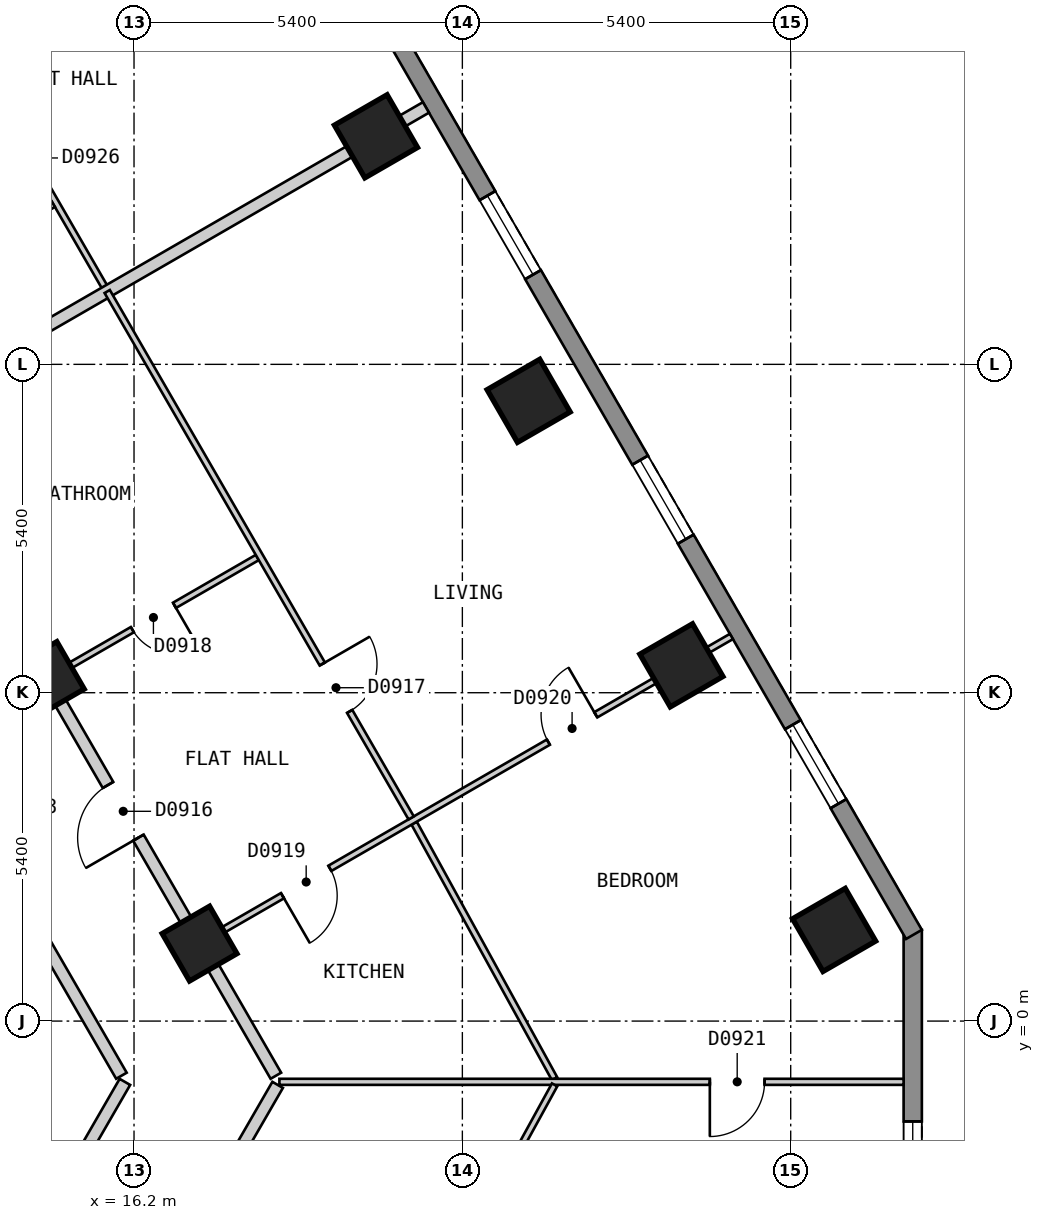
"""IFC4 building model, lengths in metres.
Left out: names, types, materials, properties, quantities, classifications, styles, units other than length and angle.
Written with IfcOpenShell. Run it as: python <this file> out.ifc"""

import sys

from ifc_helpers import new_model, si_unit, direction, frame, frame_2d, origin, origin_2d, place, context, subcontext, project, spatial, polyline, rectangle, outline, extrude, element, fill, save


model = new_model("IFC4")
c1 = context("Model", 3, precision=1e-05, world=origin(), true_north=direction((0.0, 1.0)))
c2 = subcontext(c1, "Body", "Model", "MODEL_VIEW")
j1 = project(units=[si_unit("LENGTHUNIT", "METRE"), si_unit("PLANEANGLEUNIT", "RADIAN")], contexts=[c1])
p1 = place(None, origin())
s1 = spatial("IfcSite", under=j1, at=p1, CompositionType="ELEMENT")
p2 = place(p1, origin())
s2 = spatial("IfcBuilding", under=s1, at=p2, CompositionType="ELEMENT")
p3 = place(p2, frame((0.0, 0.0, 90.0)))
s3 = spatial("IfcBuildingStorey", under=s2, at=p3, CompositionType="ELEMENT", Elevation=90.0)
for number, where, z_axis, x_axis in (
    (1, (27.714, 1.499, 0.0), (0.0, 0.0, 1.0), (-0.5, 0.866, 0.0)),
    (2, (25.202, 5.85, 0.0), (0.0, 0.0, 1.0), (-0.5, 0.866, 0.0)),
    (3, (22.69, 10.2, 0.0), (0.0, 0.0, 1.0), (-0.5, 0.866, 0.0)),
    (4, (20.179, 14.55, 0.0), (0.0, 0.0, 1.0), (-0.5, 0.866, 0.0)),
):
    element("IfcColumn", number, at=place(p3, frame(where, z_axis=z_axis, x_axis=x_axis)), inside=s3, PredefinedType="COLUMN", context=c2, shape_type="SweptSolid", body=[
        extrude(rectangle(XDim=1.0, YDim=1.0, at=origin_2d()), origin(), (0.0, 0.0, 1.0), 3.0),
    ])
for number, where, z_axis, x_axis in (
    (5, (17.278, 1.274, 0.0), (0.0, 0.0, 1.0), (-0.5, 0.866, 0.0)),
    (6, (14.766, 5.625, 0.0), (0.0, 0.0, 1.0), (-0.5, 0.866, 0.0)),
):
    element("IfcColumn", number, at=place(p3, frame(where, z_axis=z_axis, x_axis=x_axis)), inside=s3, PredefinedType="COLUMN", context=c2, shape_type="SweptSolid", body=[
        extrude(rectangle(XDim=0.9, YDim=0.9, at=origin_2d()), origin(), (0.0, 0.0, 1.0), 3.0),
    ])
p4 = place(p3, frame((29.007, -3.5, 0.0), z_axis=(0.0, 0.0, 1.0), x_axis=(0.0, 1.0, 0.0)))
e7 = element("IfcWall", 7, at=p4, inside=s3, PredefinedType="SOLIDWALL", context=c2, shape_type="SweptSolid", body=[
    extrude(outline(polyline([(0.0, -0.15), (5.0, -0.15), (4.92, 0.15), (0.08, 0.15), (0.0, -0.15)])), origin(), (0.0, 0.0, 1.0), 2.7),
])
p5 = place(p4, frame((0.65, 0.0, 0.15)))
e8 = element("IfcOpeningElement", 8, at=p5, cuts=e7, PredefinedType="OPENING", context=c2, shape_type="SweptSolid", body=[
    extrude(rectangle(XDim=1.2, YDim=2.1, at=frame_2d((0.6, 1.05))), frame((0.0, 0.16, 0.0), z_axis=(0.0, -1.0, 0.0), x_axis=(1.0, 0.0, 0.0)), (0.0, 0.0, 1.0), 0.32),
])
p6 = place(p3, frame((29.027, 1.425, 0.0), z_axis=(0.0, 0.0, 1.0), x_axis=(-0.500027479704, 0.866009537788, 0.0)))
e9 = element("IfcWall", 9, at=p6, inside=s3, PredefinedType="SOLIDWALL", context=c2, shape_type="SweptSolid", body=[
    extrude(outline(polyline([(0.0, -0.15), (26.559, -0.15), (26.478, 0.15), (0.08, 0.15), (0.0, -0.15)])), origin(), (0.0, 0.0, 1.0), 2.7),
])
p7 = place(p6, frame((2.483, 0.0, 0.15)))
e10 = element("IfcOpeningElement", 10, at=p7, cuts=e9, PredefinedType="OPENING", context=c2, shape_type="SweptSolid", body=[
    extrude(rectangle(XDim=1.5, YDim=2.1, at=frame_2d((0.75, 1.05))), frame((0.0, 0.16, 0.0), z_axis=(0.0, -1.0, 0.0), x_axis=(1.0, 0.0, 0.0)), (0.0, 0.0, 1.0), 0.32),
])
p8 = place(p6, frame((7.506, 0.0, 0.15)))
e11 = element("IfcOpeningElement", 11, at=p8, cuts=e9, PredefinedType="OPENING", context=c2, shape_type="SweptSolid", body=[
    extrude(rectangle(XDim=1.5, YDim=2.1, at=frame_2d((0.75, 1.05))), frame((0.0, 0.16, 0.0), z_axis=(0.0, -1.0, 0.0), x_axis=(1.0, 0.0, 0.0)), (0.0, 0.0, 1.0), 0.32),
])
p9 = place(p6, frame((12.529, 0.0, 0.15)))
e12 = element("IfcOpeningElement", 12, at=p9, cuts=e9, PredefinedType="OPENING", context=c2, shape_type="SweptSolid", body=[
    extrude(rectangle(XDim=1.5, YDim=2.1, at=frame_2d((0.75, 1.05))), frame((0.0, 0.16, 0.0), z_axis=(0.0, -1.0, 0.0), x_axis=(1.0, 0.0, 0.0)), (0.0, 0.0, 1.0), 0.32),
])
p10 = place(p6, frame((17.552, 0.0, 0.15)))
e13 = element("IfcOpeningElement", 13, at=p10, cuts=e9, PredefinedType="OPENING", context=c2, shape_type="SweptSolid", body=[
    extrude(rectangle(XDim=1.5, YDim=2.1, at=frame_2d((0.75, 1.05))), frame((0.0, 0.16, 0.0), z_axis=(0.0, -1.0, 0.0), x_axis=(1.0, 0.0, 0.0)), (0.0, 0.0, 1.0), 0.32),
])
p11 = place(p6, frame((22.575, 0.0, 0.15)))
e14 = element("IfcOpeningElement", 14, at=p11, cuts=e9, PredefinedType="OPENING", context=c2, shape_type="SweptSolid", body=[
    extrude(rectangle(XDim=1.5, YDim=2.1, at=frame_2d((0.75, 1.05))), frame((0.0, 0.16, 0.0), z_axis=(0.0, -1.0, 0.0), x_axis=(1.0, 0.0, 0.0)), (0.0, 0.0, 1.0), 0.32),
])
p12 = place(p3, frame((10.913, 7.899, 0.0), z_axis=(0.0, 0.0, 1.0), x_axis=(0.500028940566, -0.866008694296, 0.0)))
e15 = element("IfcWall", 15, at=p12, inside=s3, PredefinedType="PARTITIONING", context=c2, shape_type="SweptSolid", body=[
    extrude(rectangle(XDim=10.159, YDim=0.2, at=frame_2d((5.08, 0.0))), origin(), (0.0, 0.0, 1.0), 2.7),
])
p13 = place(p12, frame((4.63, 0.0, 0.0)))
e16 = element("IfcOpeningElement", 16, at=p13, cuts=e15, PredefinedType="OPENING", context=c2, shape_type="SweptSolid", body=[
    extrude(rectangle(XDim=0.9, YDim=2.1, at=frame_2d((0.45, 1.05))), frame((0.0, 0.11, 0.0), z_axis=(0.0, -1.0, 0.0), x_axis=(1.0, 0.0, 0.0)), (0.0, 0.0, 1.0), 0.22),
])
p14 = place(p3, frame((8.488, 16.5, 0.0), z_axis=(0.0, 0.0, 1.0), x_axis=(0.499986836607, -0.86603300354, 0.0)))
e17 = element("IfcWall", 17, at=p14, inside=s3, PredefinedType="PARTITIONING", context=c2, shape_type="SweptSolid", body=[
    extrude(rectangle(XDim=20.09, YDim=0.2, at=frame_2d((10.045, 0.0))), origin(), (0.0, 0.0, 1.0), 2.7),
])
p15 = place(p14, frame((14.569, 0.0, 0.0)))
e18 = element("IfcOpeningElement", 18, at=p15, cuts=e17, PredefinedType="OPENING", context=c2, shape_type="SweptSolid", body=[
    extrude(rectangle(XDim=1.0, YDim=2.1, at=frame_2d((0.5, 1.05))), frame((0.0, 0.11, 0.0), z_axis=(0.0, -1.0, 0.0), x_axis=(1.0, 0.0, 0.0)), (0.0, 0.0, 1.0), 0.22),
])
p16 = place(p14, frame((4.547, 0.0, 0.0)))
e19 = element("IfcOpeningElement", 19, at=p16, cuts=e17, PredefinedType="OPENING", context=c2, shape_type="SweptSolid", body=[
    extrude(rectangle(XDim=1.0, YDim=2.1, at=frame_2d((0.5, 1.05))), frame((0.0, 0.11, 0.0), z_axis=(0.0, -1.0, 0.0), x_axis=(1.0, 0.0, 0.0)), (0.0, 0.0, 1.0), 0.22),
])
p17 = place(p3, frame((15.011, -2.8, 0.0), z_axis=(0.0, 0.0, 1.0), x_axis=(0.499929208183, 0.866066271601, 0.0)))
e20 = element("IfcWall", 20, at=p17, inside=s3, PredefinedType="PARTITIONING", context=c2, shape_type="SweptSolid", body=[
    extrude(rectangle(XDim=2.078, YDim=0.2, at=frame_2d((1.039, 0.0))), origin(), (0.0, 0.0, 1.0), 2.7),
])
p18 = place(p3, frame((15.771, -5.884, 0.0), z_axis=(0.0, 0.0, 1.0), x_axis=(0.499939494019, 0.866060334111, 0.0)))
e21 = element("IfcWall", 21, at=p18, inside=s3, PredefinedType="PARTITIONING", context=c2, shape_type="SweptSolid", body=[
    extrude(rectangle(XDim=5.583, YDim=0.2, at=frame_2d((2.792, 0.0))), origin(), (0.0, 0.0, 1.0), 2.7),
])
p19 = place(p3, frame((13.263, 16.322, 0.0), z_axis=(0.0, 0.0, 1.0), x_axis=(0.499946798379, -0.866056117576, 0.0)))
e22 = element("IfcWall", 22, at=p19, inside=s3, PredefinedType="PARTITIONING", context=c2, shape_type="SweptSolid", body=[
    extrude(rectangle(XDim=4.993, YDim=0.1, at=frame_2d((2.496, 0.0))), origin(), (0.0, 0.0, 1.0), 2.7),
])
p20 = place(p19, frame((2.007, 0.0, 0.0)))
e23 = element("IfcOpeningElement", 23, at=p20, cuts=e22, PredefinedType="OPENING", context=c2, shape_type="SweptSolid", body=[
    extrude(rectangle(XDim=0.9, YDim=2.1, at=frame_2d((0.45, 1.05))), frame((0.0, 0.06, 0.0), z_axis=(0.0, -1.0, 0.0), x_axis=(1.0, 0.0, 0.0)), (0.0, 0.0, 1.0), 0.12),
])
p21 = place(p3, frame((20.807, 3.255, 0.0), z_axis=(0.0, 0.0, 1.0), x_axis=(0.481604009855, -0.876388942018, 0.0)))
e24 = element("IfcWall", 24, at=p21, inside=s3, PredefinedType="PARTITIONING", context=c2, shape_type="SweptSolid", body=[
    extrude(rectangle(XDim=4.795, YDim=0.1, at=frame_2d((2.397, 0.0))), origin(), (0.0, 0.0, 1.0), 2.7),
])
p22 = place(p3, frame((18.591, -0.999, 0.0), z_axis=(0.0, 0.0, 1.0), x_axis=(1.0, 0.0, 0.0)))
e25 = element("IfcWall", 25, at=p22, inside=s3, PredefinedType="PARTITIONING", context=c2, shape_type="SweptSolid", body=[
    extrude(rectangle(XDim=10.266, YDim=0.1, at=frame_2d((5.133, 0.0))), origin(), (0.0, 0.0, 1.0), 2.7),
])
p23 = place(p22, frame((7.079, 0.0, 0.0)))
e26 = element("IfcOpeningElement", 26, at=p23, cuts=e25, PredefinedType="OPENING", context=c2, shape_type="SweptSolid", body=[
    extrude(rectangle(XDim=0.9, YDim=2.1, at=frame_2d((0.45, 1.05))), frame((0.0, 0.06, 0.0), z_axis=(0.0, -1.0, 0.0), x_axis=(1.0, 0.0, 0.0)), (0.0, 0.0, 1.0), 0.12),
])
p24 = place(p3, frame((20.812, -5.248, 0.0), z_axis=(0.0, 0.0, 1.0), x_axis=(0.481196609449, 0.876612698434, 0.0)))
e27 = element("IfcWall", 27, at=p24, inside=s3, PredefinedType="PARTITIONING", context=c2, shape_type="SweptSolid", body=[
    extrude(rectangle(XDim=4.79, YDim=0.1, at=frame_2d((2.395, 0.0))), origin(), (0.0, 0.0, 1.0), 2.7),
])
p25 = place(p24, frame((2.023, 0.0, 0.0)))
e28 = element("IfcOpeningElement", 28, at=p25, cuts=e27, PredefinedType="OPENING", context=c2, shape_type="SweptSolid", body=[
    extrude(rectangle(XDim=0.8, YDim=2.1, at=frame_2d((0.4, 1.05))), frame((0.0, 0.06, 0.0), z_axis=(0.0, -1.0, 0.0), x_axis=(1.0, 0.0, 0.0)), (0.0, 0.0, 1.0), 0.12),
])
p26 = place(p3, frame((17.365, 1.325, 0.0), z_axis=(0.0, 0.0, 1.0), x_axis=(0.866016855193, 0.500014806302, 0.0)))
e29 = element("IfcWall", 29, at=p26, inside=s3, PredefinedType="PARTITIONING", context=c2, shape_type="SweptSolid", body=[
    extrude(rectangle(XDim=10.0, YDim=0.1, at=frame_2d((5.0, 0.0))), origin(), (0.0, 0.0, 1.0), 2.7),
])
p27 = place(p26, frame((1.474, 0.0, 0.0)))
e30 = element("IfcOpeningElement", 30, at=p27, cuts=e29, PredefinedType="OPENING", context=c2, shape_type="SweptSolid", body=[
    extrude(rectangle(XDim=0.9, YDim=2.1, at=frame_2d((0.45, 1.05))), frame((0.0, 0.06, 0.0), z_axis=(0.0, -1.0, 0.0), x_axis=(1.0, 0.0, 0.0)), (0.0, 0.0, 1.0), 0.12),
])
p28 = place(p26, frame((6.524, 0.0, 0.0)))
e31 = element("IfcOpeningElement", 31, at=p28, cuts=e29, PredefinedType="OPENING", context=c2, shape_type="SweptSolid", body=[
    extrude(rectangle(XDim=0.9, YDim=2.1, at=frame_2d((0.45, 1.05))), frame((0.0, 0.06, 0.0), z_axis=(0.0, -1.0, 0.0), x_axis=(1.0, 0.0, 0.0)), (0.0, 0.0, 1.0), 0.12),
])
p29 = place(p3, frame((14.853, 5.675, 0.0), z_axis=(0.0, 0.0, 1.0), x_axis=(0.865979019114, 0.500080332001, 0.0)))
e32 = element("IfcWall", 32, at=p29, inside=s3, PredefinedType="PARTITIONING", context=c2, shape_type="SweptSolid", body=[
    extrude(rectangle(XDim=3.897, YDim=0.1, at=frame_2d((1.949, 0.0))), origin(), (0.0, 0.0, 1.0), 2.7),
])
p30 = place(p29, frame((1.524, 0.0, 0.0)))
e33 = element("IfcOpeningElement", 33, at=p30, cuts=e32, PredefinedType="OPENING", context=c2, shape_type="SweptSolid", body=[
    extrude(rectangle(XDim=0.8, YDim=2.1, at=frame_2d((0.4, 1.05))), frame((0.0, 0.06, 0.0), z_axis=(0.0, -1.0, 0.0), x_axis=(1.0, 0.0, 0.0)), (0.0, 0.0, 1.0), 0.12),
])
p31 = place(p3, frame((11.522, 11.444, 0.0), z_axis=(0.0, 0.0, 1.0), x_axis=(0.860134781641, 0.510066816615, 0.0)))
e34 = element("IfcWall", 34, at=p31, inside=s3, PredefinedType="PARTITIONING", context=c2, shape_type="SweptSolid", body=[
    extrude(rectangle(XDim=3.897, YDim=0.1, at=frame_2d((1.949, 0.0))), origin(), (0.0, 0.0, 1.0), 2.7),
])
p32 = place(p31, frame((1.473, 0.0, 0.0)))
e35 = element("IfcOpeningElement", 35, at=p32, cuts=e34, PredefinedType="OPENING", context=c2, shape_type="SweptSolid", body=[
    extrude(rectangle(XDim=0.9, YDim=2.1, at=frame_2d((0.45, 1.05))), frame((0.0, 0.06, 0.0), z_axis=(0.0, -1.0, 0.0), x_axis=(1.0, 0.0, 0.0)), (0.0, 0.0, 1.0), 0.12),
])
p33 = place(p3, frame((12.342, 10.025, 0.0), z_axis=(0.0, 0.0, 1.0), x_axis=(0.865992435864, 0.500057097767, 0.0)))
e36 = element("IfcWall", 36, at=p33, inside=s3, PredefinedType="PARTITIONING", context=c2, shape_type="SweptSolid", body=[
    extrude(rectangle(XDim=9.999, YDim=0.2, at=frame_2d((5.0, 0.0))), origin(), (0.0, 0.0, 1.0), 2.7),
])
p34 = place(p3, frame((15.759, 11.998, 0.0), z_axis=(0.0, 0.0, 1.0), x_axis=(0.500068444113, -0.865985883951, 0.0)))
e37 = element("IfcWall", 37, at=p34, inside=s3, PredefinedType="PARTITIONING", context=c2, shape_type="SweptSolid", body=[
    extrude(rectangle(XDim=9.997, YDim=0.1, at=frame_2d((4.998, 0.0))), origin(), (0.0, 0.0, 1.0), 2.7),
])
p35 = place(p34, frame((7.074, 0.0, 0.0)))
e38 = element("IfcOpeningElement", 38, at=p35, cuts=e37, PredefinedType="OPENING", context=c2, shape_type="SweptSolid", body=[
    extrude(rectangle(XDim=0.9, YDim=2.1, at=frame_2d((0.45, 1.05))), frame((0.0, 0.06, 0.0), z_axis=(0.0, -1.0, 0.0), x_axis=(1.0, 0.0, 0.0)), (0.0, 0.0, 1.0), 0.12),
])
p36 = place(p5, origin())
e39 = element("IfcWindow", 39, at=p36, inside=s3, PartitioningType="SINGLE_PANEL", PredefinedType="WINDOW", context=c2, shape_type="SweptSolid", body=[
    extrude(rectangle(XDim=1.2, YDim=2.1, at=frame_2d((0.6, 1.05))), frame((0.0, 0.03, 0.0), z_axis=(0.0, -1.0, 0.0), x_axis=(1.0, 0.0, 0.0)), (0.0, 0.0, 1.0), 0.06),
])
fill(e8, e39)
p37 = place(p7, origin())
e40 = element("IfcWindow", 40, at=p37, inside=s3, PartitioningType="SINGLE_PANEL", PredefinedType="WINDOW", context=c2, shape_type="SweptSolid", body=[
    extrude(rectangle(XDim=1.5, YDim=2.1, at=frame_2d((0.75, 1.05))), frame((0.0, 0.03, 0.0), z_axis=(0.0, -1.0, 0.0), x_axis=(1.0, 0.0, 0.0)), (0.0, 0.0, 1.0), 0.06),
])
fill(e10, e40)
p38 = place(p8, origin())
e41 = element("IfcWindow", 41, at=p38, inside=s3, PartitioningType="SINGLE_PANEL", PredefinedType="WINDOW", context=c2, shape_type="SweptSolid", body=[
    extrude(rectangle(XDim=1.5, YDim=2.1, at=frame_2d((0.75, 1.05))), frame((0.0, 0.03, 0.0), z_axis=(0.0, -1.0, 0.0), x_axis=(1.0, 0.0, 0.0)), (0.0, 0.0, 1.0), 0.06),
])
fill(e11, e41)
p39 = place(p9, origin())
e42 = element("IfcWindow", 42, at=p39, inside=s3, PartitioningType="SINGLE_PANEL", PredefinedType="WINDOW", context=c2, shape_type="SweptSolid", body=[
    extrude(rectangle(XDim=1.5, YDim=2.1, at=frame_2d((0.75, 1.05))), frame((0.0, 0.03, 0.0), z_axis=(0.0, -1.0, 0.0), x_axis=(1.0, 0.0, 0.0)), (0.0, 0.0, 1.0), 0.06),
])
fill(e12, e42)
p40 = place(p15, origin())
e43 = element("IfcDoor", 43, at=p40, inside=s3, OperationType="SINGLE_SWING_RIGHT", PredefinedType="DOOR", context=c2, shape_type="SweptSolid", body=[
    extrude(rectangle(XDim=1.0, YDim=2.1, at=frame_2d((0.5, 1.05))), frame((0.0, 0.025, 0.0), z_axis=(0.0, -1.0, 0.0), x_axis=(1.0, 0.0, 0.0)), (0.0, 0.0, 1.0), 0.05),
])
fill(e18, e43)
p41 = place(p35, origin())
e44 = element("IfcDoor", 44, at=p41, inside=s3, OperationType="SINGLE_SWING_LEFT", PredefinedType="DOOR", context=c2, shape_type="SweptSolid", body=[
    extrude(rectangle(XDim=0.9, YDim=2.1, at=frame_2d((0.45, 1.05))), frame((0.0, 0.025, 0.0), z_axis=(0.0, -1.0, 0.0), x_axis=(1.0, 0.0, 0.0)), (0.0, 0.0, 1.0), 0.05),
])
fill(e38, e44)
p42 = place(p30, origin())
e45 = element("IfcDoor", 45, at=p42, inside=s3, OperationType="SINGLE_SWING_RIGHT", PredefinedType="DOOR", context=c2, shape_type="SweptSolid", body=[
    extrude(rectangle(XDim=0.8, YDim=2.1, at=frame_2d((0.4, 1.05))), frame((0.0, 0.025, 0.0), z_axis=(0.0, -1.0, 0.0), x_axis=(1.0, 0.0, 0.0)), (0.0, 0.0, 1.0), 0.05),
])
fill(e33, e45)
p43 = place(p27, origin())
e46 = element("IfcDoor", 46, at=p43, inside=s3, OperationType="SINGLE_SWING_LEFT", PredefinedType="DOOR", context=c2, shape_type="SweptSolid", body=[
    extrude(rectangle(XDim=0.9, YDim=2.1, at=frame_2d((0.45, 1.05))), frame((0.0, 0.025, 0.0), z_axis=(0.0, -1.0, 0.0), x_axis=(1.0, 0.0, 0.0)), (0.0, 0.0, 1.0), 0.05),
])
fill(e30, e46)
p44 = place(p28, origin())
e47 = element("IfcDoor", 47, at=p44, inside=s3, OperationType="SINGLE_SWING_RIGHT", PredefinedType="DOOR", context=c2, shape_type="SweptSolid", body=[
    extrude(rectangle(XDim=0.9, YDim=2.1, at=frame_2d((0.45, 1.05))), frame((0.0, 0.025, 0.0), z_axis=(0.0, -1.0, 0.0), x_axis=(1.0, 0.0, 0.0)), (0.0, 0.0, 1.0), 0.05),
])
fill(e31, e47)
p45 = place(p23, origin())
e48 = element("IfcDoor", 48, at=p45, inside=s3, OperationType="SINGLE_SWING_LEFT", PredefinedType="DOOR", context=c2, shape_type="SweptSolid", body=[
    extrude(rectangle(XDim=0.9, YDim=2.1, at=frame_2d((0.45, 1.05))), frame((0.0, 0.025, 0.0), z_axis=(0.0, -1.0, 0.0), x_axis=(1.0, 0.0, 0.0)), (0.0, 0.0, 1.0), 0.05),
])
fill(e26, e48)
save(model, sys.argv[1])
